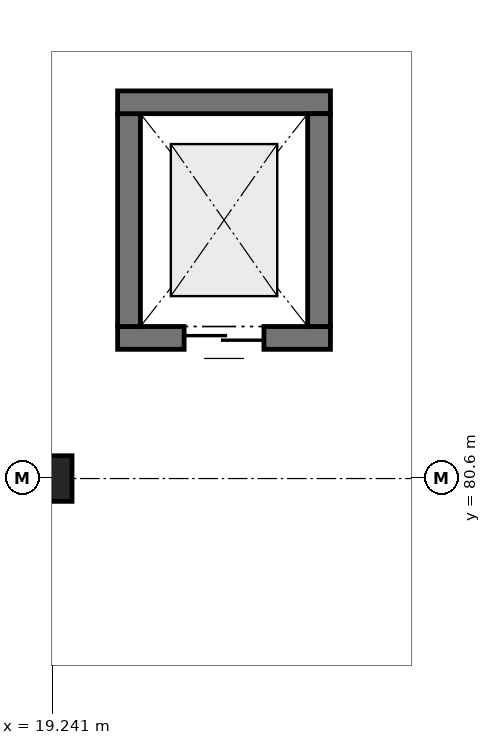
"""IFC4 building model, lengths in metres.
Left out: names, types, materials, properties, quantities, classifications, styles, units other than length and angle.
Written with IfcOpenShell. Run it as: python <this file> out.ifc"""

import sys

from ifc_helpers import new_model, si_unit, direction, frame, frame_2d, origin, origin_2d, place, context, subcontext, project, spatial, rectangle, extrude, element, fill, save


model = new_model("IFC4")
c1 = context("Model", 3, precision=1e-05, world=origin(), true_north=direction((0.0, 1.0)))
c2 = subcontext(c1, "Body", "Model", "MODEL_VIEW")
j1 = project(units=[si_unit("LENGTHUNIT", "METRE"), si_unit("PLANEANGLEUNIT", "RADIAN")], contexts=[c1])
p1 = place(None, origin())
s1 = spatial("IfcSite", under=j1, at=p1, CompositionType="ELEMENT")
p2 = place(p1, origin())
s2 = spatial("IfcBuilding", under=s1, at=p2, CompositionType="ELEMENT")
p3 = place(p2, frame((0.0, 0.0, 9.0)))
s3 = spatial("IfcBuildingStorey", under=s2, at=p3, CompositionType="ELEMENT", Elevation=9.0)
p4 = place(p3, frame((19.2, 80.6, 0.0), z_axis=(0.0, 0.0, 1.0), x_axis=(1.0, 0.0, 0.0)))
e1 = element("IfcColumn", 1, at=p4, inside=s3, PredefinedType="COLUMN", context=c2, shape_type="SweptSolid", body=[
    extrude(rectangle(XDim=0.6, YDim=0.6, at=origin_2d()), origin(), (0.0, 0.0, 1.0), 4.2),
])
p5 = place(p3, frame((22.9, 82.45, 0.0), z_axis=(0.0, 0.0, 1.0), x_axis=(-1.0, 0.0, 0.0)))
e2 = element("IfcWall", 2, at=p5, inside=s3, PredefinedType="SOLIDWALL", context=c2, shape_type="SweptSolid", body=[
    extrude(rectangle(XDim=2.8, YDim=0.3, at=frame_2d((1.4, 0.0))), origin(), (0.0, 0.0, 1.0), 4.2),
])
p6 = place(p5, frame((0.875, 0.0, 0.0)))
e3 = element("IfcOpeningElement", 3, at=p6, cuts=e2, PredefinedType="OPENING", context=c2, shape_type="SweptSolid", body=[
    extrude(rectangle(XDim=1.05, YDim=2.15, at=frame_2d((0.525, 1.075))), frame((0.0, 0.17, 0.0), z_axis=(0.0, -1.0, 0.0), x_axis=(1.0, 0.0, 0.0)), (0.0, 0.0, 1.0), 0.34),
])
for number, where, z_axis, x_axis in (
    (4, (20.25, 82.6, 0.0), (0.0, 0.0, 1.0), (0.0, 1.0, 0.0)),
    (5, (20.1, 85.55, 0.0), (0.0, 0.0, 1.0), (1.0, 0.0, 0.0)),
    (6, (22.75, 85.4, 0.0), (0.0, 0.0, 1.0), (0.0, -1.0, 0.0)),
):
    element("IfcWall", number, at=place(p3, frame(where, z_axis=z_axis, x_axis=x_axis)), inside=s3, PredefinedType="SOLIDWALL", context=c2, shape_type="SweptSolid", body=[
        extrude(rectangle(XDim=2.8, YDim=0.3, at=frame_2d((1.4, 0.0))), origin(), (0.0, 0.0, 1.0), 4.2),
    ])
p7 = place(p6, origin())
e7 = element("IfcDoor", 7, at=p7, inside=s3, OperationType="DOUBLE_DOOR_SLIDING", PredefinedType="DOOR", context=c2, shape_type="SweptSolid", body=[
    extrude(rectangle(XDim=1.05, YDim=2.15, at=frame_2d((0.525, 1.075))), frame((0.0, 0.025, 0.0), z_axis=(0.0, -1.0, 0.0), x_axis=(1.0, 0.0, 0.0)), (0.0, 0.0, 1.0), 0.05),
])
fill(e3, e7)
save(model, sys.argv[1])
